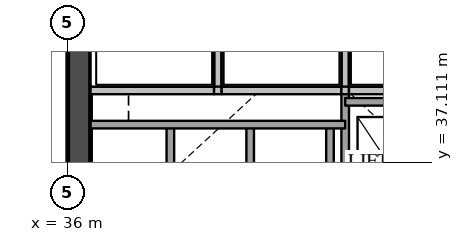
"""IFC4 building model, lengths in metres.
Left out: names, types, materials, properties, quantities, classifications, styles, units other than length and angle.
Written with IfcOpenShell. Run it as: python <this file> out.ifc"""

import sys

from ifc_helpers import new_model, si_unit, direction, frame, frame_2d, origin, place, context, subcontext, project, spatial, rectangle, extrude, element, save


model = new_model("IFC4")
c1 = context("Model", 3, precision=1e-05, world=origin(), true_north=direction((0.0, 1.0)))
c2 = subcontext(c1, "Body", "Model", "MODEL_VIEW")
j1 = project(units=[si_unit("LENGTHUNIT", "METRE"), si_unit("PLANEANGLEUNIT", "RADIAN")], contexts=[c1])
p1 = place(None, origin())
s1 = spatial("IfcSite", under=j1, at=p1, CompositionType="ELEMENT")
p2 = place(p1, origin())
s2 = spatial("IfcBuilding", under=s1, at=p2, CompositionType="ELEMENT")
p3 = place(p2, frame((0.0, 0.0, 8.0)))
s3 = spatial("IfcBuildingStorey", under=s2, at=p3, CompositionType="ELEMENT", Elevation=8.0)
p4 = place(p3, frame((36.3, 29.1, 0.0), z_axis=(0.0, 0.0, 1.0), x_axis=(0.0, 1.0, 0.0)))
e1 = element("IfcWall", 1, at=p4, inside=s3, PredefinedType="SHEAR", context=c2, shape_type="SweptSolid", body=[
    extrude(rectangle(XDim=20.3, YDim=0.6, at=frame_2d((10.15, 0.0))), origin(), (0.0, 0.0, 1.0), 5.59),
])
p5 = place(p3, frame((38.7, 34.9, 0.0), z_axis=(0.0, 0.0, 1.0), x_axis=(0.0, 1.0, 0.0)))
e2 = element("IfcWall", 2, at=p5, inside=s3, PredefinedType="SOLIDWALL", context=c2, shape_type="SweptSolid", body=[
    extrude(rectangle(XDim=3.2, YDim=0.2, at=frame_2d((1.6, 0.0))), origin(), (0.0, 0.0, 1.0), 5.59),
])
p6 = place(p3, frame((39.95, 39.0, 0.0), z_axis=(0.0, 0.0, 1.0), x_axis=(0.0, 1.0, 0.0)))
e3 = element("IfcWall", 3, at=p6, inside=s3, PredefinedType="SOLIDWALL", context=c2, shape_type="SweptSolid", body=[
    extrude(rectangle(XDim=2.02, YDim=0.2, at=frame_2d((1.01, 0.0))), origin(), (0.0, 0.0, 1.0), 5.59),
])
for number, where, z_axis, x_axis in (
    (4, (40.8, 34.9, 0.0), (0.0, 0.0, 1.0), (0.0, 1.0, 0.0)),
    (5, (42.9, 34.9, 0.0), (0.0, 0.0, 1.0), (0.0, 1.0, 0.0)),
):
    element("IfcWall", number, at=place(p3, frame(where, z_axis=z_axis, x_axis=x_axis)), inside=s3, PredefinedType="SOLIDWALL", context=c2, shape_type="SweptSolid", body=[
        extrude(rectangle(XDim=3.2, YDim=0.2, at=frame_2d((1.6, 0.0))), origin(), (0.0, 0.0, 1.0), 5.59),
    ])
p7 = place(p3, frame((43.3, 29.1, 0.0), z_axis=(0.0, 0.0, 1.0), x_axis=(0.0, 1.0, 0.0)))
e6 = element("IfcWall", 6, at=p7, inside=s3, PredefinedType="SOLIDWALL", context=c2, shape_type="SweptSolid", body=[
    extrude(rectangle(XDim=9.9, YDim=0.2, at=frame_2d((4.95, 0.0))), origin(), (0.0, 0.0, 1.0), 5.59),
])
p8 = place(p7, frame((3.6, 0.0, 0.0)))
e7 = element("IfcOpeningElement", 7, at=p8, cuts=e6, PredefinedType="OPENING", context=c2, shape_type="SweptSolid", body=[
    extrude(rectangle(XDim=1.8, YDim=2.1, at=frame_2d((0.9, 1.05))), frame((0.0, 0.11, 0.0), z_axis=(0.0, -1.0, 0.0), x_axis=(1.0, 0.0, 0.0)), (0.0, 0.0, 1.0), 0.22),
])
p9 = place(p3, frame((43.3, 39.0, 0.0), z_axis=(0.0, 0.0, 1.0), x_axis=(0.0, 1.0, 0.0)))
e8 = element("IfcWall", 8, at=p9, inside=s3, PredefinedType="SOLIDWALL", context=c2, shape_type="SweptSolid", body=[
    extrude(rectangle(XDim=2.02, YDim=0.2, at=frame_2d((1.01, 0.0))), origin(), (0.0, 0.0, 1.0), 5.59),
])
p10 = place(p3, frame((36.6, 38.1, 0.0), z_axis=(0.0, 0.0, 1.0), x_axis=(1.0, 0.0, 0.0)))
e9 = element("IfcWall", 9, at=p10, inside=s3, PredefinedType="SOLIDWALL", context=c2, shape_type="SweptSolid", body=[
    extrude(rectangle(XDim=6.7, YDim=0.2, at=frame_2d((3.35, 0.0))), origin(), (0.0, 0.0, 1.0), 5.59),
])
p11 = place(p3, frame((43.3, 38.7, 0.0), z_axis=(0.0, 0.0, 1.0), x_axis=(1.0, 0.0, 0.0)))
e10 = element("IfcWall", 10, at=p11, inside=s3, PredefinedType="SOLIDWALL", context=c2, shape_type="SweptSolid", body=[
    extrude(rectangle(XDim=4.5, YDim=0.2, at=frame_2d((2.25, 0.0))), origin(), (0.0, 0.0, 1.0), 5.59),
])
p12 = place(p3, frame((36.6, 39.0, 0.0), z_axis=(0.0, 0.0, 1.0), x_axis=(1.0, 0.0, 0.0)))
e11 = element("IfcWall", 11, at=p12, inside=s3, PredefinedType="SOLIDWALL", context=c2, shape_type="SweptSolid", body=[
    extrude(rectangle(XDim=3.25, YDim=0.2, at=frame_2d((1.625, 0.0))), origin(), (0.0, 0.0, 1.0), 5.59),
])
p13 = place(p3, frame((39.85, 39.0, 0.0), z_axis=(0.0, 0.0, 1.0), x_axis=(1.0, 0.0, 0.0)))
e12 = element("IfcWall", 12, at=p13, inside=s3, PredefinedType="SOLIDWALL", context=c2, shape_type="SweptSolid", body=[
    extrude(rectangle(XDim=0.2, YDim=0.2, at=frame_2d((0.1, 0.0))), origin(), (0.0, 0.0, 1.0), 5.59),
])
p14 = place(p3, frame((40.05, 39.0, 0.0), z_axis=(0.0, 0.0, 1.0), x_axis=(1.0, 0.0, 0.0)))
e13 = element("IfcWall", 13, at=p14, inside=s3, PredefinedType="SOLIDWALL", context=c2, shape_type="SweptSolid", body=[
    extrude(rectangle(XDim=3.15, YDim=0.2, at=frame_2d((1.575, 0.0))), origin(), (0.0, 0.0, 1.0), 5.59),
])
p15 = place(p3, frame((43.2, 39.0, 0.0), z_axis=(0.0, 0.0, 1.0), x_axis=(1.0, 0.0, 0.0)))
e14 = element("IfcWall", 14, at=p15, inside=s3, PredefinedType="SOLIDWALL", context=c2, shape_type="SweptSolid", body=[
    extrude(rectangle(XDim=0.2, YDim=0.2, at=frame_2d((0.1, 0.0))), origin(), (0.0, 0.0, 1.0), 5.59),
])
p16 = place(p3, frame((43.4, 39.0, 0.0), z_axis=(0.0, 0.0, 1.0), x_axis=(1.0, 0.0, 0.0)))
e15 = element("IfcWall", 15, at=p16, inside=s3, PredefinedType="SOLIDWALL", context=c2, shape_type="SweptSolid", body=[
    extrude(rectangle(XDim=3.25, YDim=0.2, at=frame_2d((1.625, 0.0))), origin(), (0.0, 0.0, 1.0), 5.59),
])
save(model, sys.argv[1])
